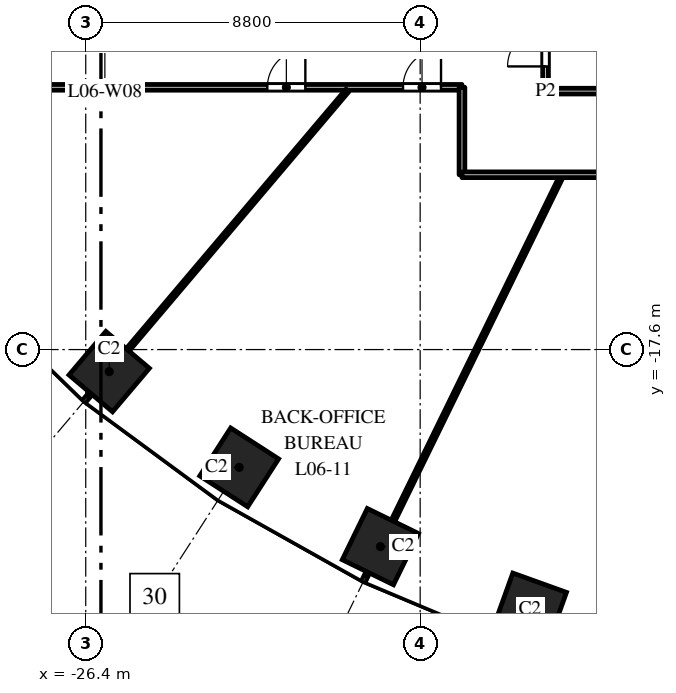
"""IFC4 building model, lengths in metres.
Left out: names, types, materials, properties, quantities, classifications, styles, units other than length and angle.
Written with IfcOpenShell. Run it as: python <this file> out.ifc"""

import sys

from ifc_helpers import new_model, si_unit, direction, frame, frame_2d, origin, origin_2d, place, context, subcontext, project, spatial, rectangle, extrude, element, fill, save


model = new_model("IFC4")
c1 = context("Model", 3, precision=1e-05, world=origin(), true_north=direction((0.0, 1.0)))
c2 = subcontext(c1, "Body", "Model", "MODEL_VIEW")
j1 = project(units=[si_unit("LENGTHUNIT", "METRE"), si_unit("PLANEANGLEUNIT", "RADIAN")], contexts=[c1])
p1 = place(None, origin())
s1 = spatial("IfcSite", under=j1, at=p1, CompositionType="ELEMENT")
p2 = place(p1, origin())
s2 = spatial("IfcBuilding", under=s1, at=p2, CompositionType="ELEMENT")
p3 = place(p2, frame((0.0, 0.0, 34.5)))
s3 = spatial("IfcBuildingStorey", under=s2, at=p3, CompositionType="ELEMENT", Elevation=34.5)
for number, where, z_axis, x_axis in (
    (1, (-25.783, -18.18, 0.0), (0.0, 0.0, 1.0), (0.763, -0.646, 0.0)),
    (2, (-22.362, -20.7, 0.0), (0.0, 0.0, 1.0), (0.84, -0.542, 0.0)),
    (3, (-18.646, -22.785, 0.0), (0.0, 0.0, 1.0), (0.898, -0.439, 0.0)),
    (4, (-14.709, -24.441, 0.0), (0.0, 0.0, 1.0), (0.941, -0.338, 0.0)),
):
    element("IfcColumn", number, at=place(p3, frame(where, z_axis=z_axis, x_axis=x_axis)), inside=s3, PredefinedType="COLUMN", context=c2, shape_type="SweptSolid", body=[
        extrude(rectangle(XDim=1.5, YDim=1.5, at=origin_2d()), origin(), (0.0, 0.0, 1.0), 4.0),
    ])
p4 = place(p3, frame((-31.5, -10.7, 0.0), z_axis=(0.0, 0.0, 1.0), x_axis=(1.0, 0.0, 0.0)))
e5 = element("IfcWall", 5, at=p4, inside=s3, PredefinedType="PARTITIONING", context=c2, shape_type="SweptSolid", body=[
    extrude(rectangle(XDim=15.0, YDim=0.15, at=frame_2d((7.5, 0.0))), origin(), (0.0, 0.0, 1.0), 3.1),
])
p5 = place(p4, frame((9.879, 0.0, 0.0)))
e6 = element("IfcOpeningElement", 6, at=p5, cuts=e5, PredefinedType="OPENING", context=c2, shape_type="SweptSolid", body=[
    extrude(rectangle(XDim=1.0, YDim=2.1, at=frame_2d((0.5, 1.05))), frame((0.0, 0.085, 0.0), z_axis=(0.0, -1.0, 0.0), x_axis=(1.0, 0.0, 0.0)), (0.0, 0.0, 1.0), 0.17),
])
p6 = place(p4, frame((13.449, 0.0, 0.0)))
e7 = element("IfcOpeningElement", 7, at=p6, cuts=e5, PredefinedType="OPENING", context=c2, shape_type="SweptSolid", body=[
    extrude(rectangle(XDim=1.0, YDim=2.1, at=frame_2d((0.5, 1.05))), frame((0.0, 0.085, 0.0), z_axis=(0.0, -1.0, 0.0), x_axis=(1.0, 0.0, 0.0)), (0.0, 0.0, 1.0), 0.17),
])
p7 = place(p3, frame((-26.43, -18.945, 0.0), z_axis=(0.0, 0.0, 1.0), x_axis=(0.646400187952, 0.762998556365, 0.0)))
e8 = element("IfcWall", 8, at=p7, inside=s3, PredefinedType="PARTITIONING", context=c2, shape_type="SweptSolid", body=[
    extrude(rectangle(XDim=10.704, YDim=0.1, at=frame_2d((5.352, 0.0))), origin(), (0.0, 0.0, 1.0), 3.7),
])
p8 = place(p3, frame((-19.086, -23.685, 0.0), z_axis=(0.0, 0.0, 1.0), x_axis=(0.439199750603, 0.898389436197, 0.0)))
e9 = element("IfcWall", 9, at=p8, inside=s3, PredefinedType="PARTITIONING", context=c2, shape_type="SweptSolid", body=[
    extrude(rectangle(XDim=11.81, YDim=0.1, at=frame_2d((5.905, 0.0))), origin(), (0.0, 0.0, 1.0), 3.7),
])
p9 = place(p3, frame((-16.5, -13.0, 0.0), z_axis=(0.0, 0.0, 1.0), x_axis=(0.0, 1.0, 0.0)))
e10 = element("IfcWall", 10, at=p9, inside=s3, PredefinedType="PARTITIONING", context=c2, shape_type="SweptSolid", body=[
    extrude(rectangle(XDim=2.3, YDim=0.15, at=frame_2d((1.15, 0.0))), origin(), (0.0, 0.0, 1.0), 2.75),
])
p10 = place(p3, frame((-16.5, -13.0, 0.0), z_axis=(0.0, 0.0, 1.0), x_axis=(1.0, 0.0, 0.0)))
e11 = element("IfcWall", 11, at=p10, inside=s3, PredefinedType="PARTITIONING", context=c2, shape_type="SweptSolid", body=[
    extrude(rectangle(XDim=9.001, YDim=0.15, at=frame_2d((4.5, 0.0))), origin(), (0.0, 0.0, 1.0), 2.85),
])
p11 = place(p10, frame((7.529, 0.0, 0.0)))
e12 = element("IfcOpeningElement", 12, at=p11, cuts=e11, PredefinedType="OPENING", context=c2, shape_type="SweptSolid", body=[
    extrude(rectangle(XDim=1.0, YDim=2.1, at=frame_2d((0.5, 1.05))), frame((0.0, 0.085, 0.0), z_axis=(0.0, -1.0, 0.0), x_axis=(1.0, 0.0, 0.0)), (0.0, 0.0, 1.0), 0.17),
])
p12 = place(p3, frame((-14.3, -10.8, 0.0), z_axis=(0.0, 0.0, 1.0), x_axis=(0.0, 1.0, 0.0)))
e13 = element("IfcWall", 13, at=p12, inside=s3, PredefinedType="PARTITIONING", context=c2, shape_type="SweptSolid", body=[
    extrude(rectangle(XDim=21.6, YDim=0.15, at=frame_2d((10.8, 0.0))), origin(), (0.0, 0.0, 1.0), 2.75),
])
p13 = place(p12, frame((0.65, 0.0, 0.0)))
e14 = element("IfcOpeningElement", 14, at=p13, cuts=e13, PredefinedType="OPENING", context=c2, shape_type="SweptSolid", body=[
    extrude(rectangle(XDim=1.0, YDim=2.1, at=frame_2d((0.5, 1.05))), frame((0.0, 0.085, 0.0), z_axis=(0.0, -1.0, 0.0), x_axis=(1.0, 0.0, 0.0)), (0.0, 0.0, 1.0), 0.17),
])
p14 = place(p3, frame((-14.3, -10.8, 0.0), z_axis=(0.0, 0.0, 1.0), x_axis=(1.0, 0.0, 0.0)))
e15 = element("IfcWall", 15, at=p14, inside=s3, PredefinedType="PARTITIONING", context=c2, shape_type="SweptSolid", body=[
    extrude(rectangle(XDim=28.6, YDim=0.15, at=frame_2d((14.3, 0.0))), origin(), (0.0, 0.0, 1.0), 2.85),
])
p15 = place(p14, frame((10.627, 0.0, 0.0)))
e16 = element("IfcOpeningElement", 16, at=p15, cuts=e15, PredefinedType="OPENING", context=c2, shape_type="SweptSolid", body=[
    extrude(rectangle(XDim=1.0, YDim=2.1, at=frame_2d((0.5, 1.05))), frame((0.0, 0.085, 0.0), z_axis=(0.0, -1.0, 0.0), x_axis=(1.0, 0.0, 0.0)), (0.0, 0.0, 1.0), 0.17),
])
p16 = place(p14, frame((15.393, 0.0, 0.0)))
e17 = element("IfcOpeningElement", 17, at=p16, cuts=e15, PredefinedType="OPENING", context=c2, shape_type="SweptSolid", body=[
    extrude(rectangle(XDim=1.0, YDim=2.1, at=frame_2d((0.5, 1.05))), frame((0.0, 0.085, 0.0), z_axis=(0.0, -1.0, 0.0), x_axis=(1.0, 0.0, 0.0)), (0.0, 0.0, 1.0), 0.17),
])
p17 = place(p13, origin())
e18 = element("IfcDoor", 18, at=p17, inside=s3, OperationType="SINGLE_SWING_LEFT", PredefinedType="DOOR", context=c2, shape_type="SweptSolid", body=[
    extrude(rectangle(XDim=1.0, YDim=2.1, at=frame_2d((0.5, 1.05))), frame((0.0, 0.025, 0.0), z_axis=(0.0, -1.0, 0.0), x_axis=(1.0, 0.0, 0.0)), (0.0, 0.0, 1.0), 0.05),
])
fill(e14, e18)
p18 = place(p5, origin())
e19 = element("IfcDoor", 19, at=p18, inside=s3, OperationType="SINGLE_SWING_RIGHT", PredefinedType="DOOR", context=c2, shape_type="SweptSolid", body=[
    extrude(rectangle(XDim=1.0, YDim=2.1, at=frame_2d((0.5, 1.05))), frame((0.0, 0.025, 0.0), z_axis=(0.0, -1.0, 0.0), x_axis=(1.0, 0.0, 0.0)), (0.0, 0.0, 1.0), 0.05),
])
fill(e6, e19)
p19 = place(p6, origin())
e20 = element("IfcDoor", 20, at=p19, inside=s3, OperationType="SINGLE_SWING_RIGHT", PredefinedType="DOOR", context=c2, shape_type="SweptSolid", body=[
    extrude(rectangle(XDim=1.0, YDim=2.1, at=frame_2d((0.5, 1.05))), frame((0.0, 0.025, 0.0), z_axis=(0.0, -1.0, 0.0), x_axis=(1.0, 0.0, 0.0)), (0.0, 0.0, 1.0), 0.05),
])
fill(e7, e20)
save(model, sys.argv[1])
